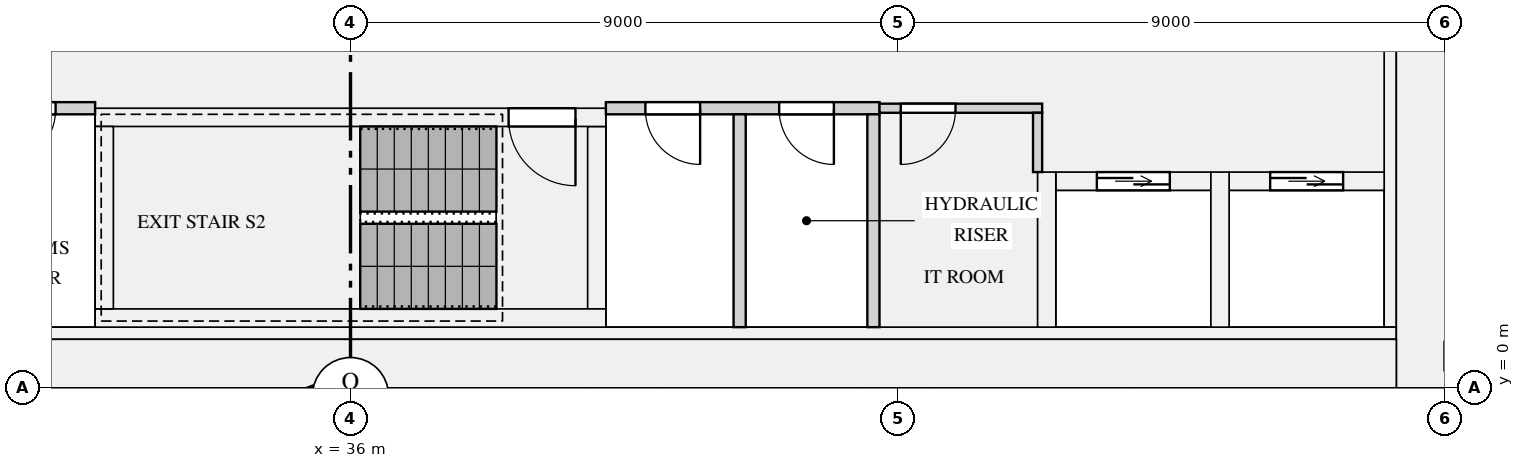
"""IFC4 building model, lengths in metres.
Left out: names, types, materials, properties, quantities, classifications, styles, units other than length and angle.
Written with IfcOpenShell. Run it as: python <this file> out.ifc"""

import sys

from ifc_helpers import new_model, si_unit, direction, frame, frame_2d, origin, place, context, subcontext, project, spatial, rectangle, extrude, element, fill, save


model = new_model("IFC4")
c1 = context("Model", 3, precision=1e-05, world=origin(), true_north=direction((0.0, 1.0)))
c2 = subcontext(c1, "Body", "Model", "MODEL_VIEW")
j1 = project(units=[si_unit("LENGTHUNIT", "METRE"), si_unit("PLANEANGLEUNIT", "RADIAN")], contexts=[c1])
p1 = place(None, origin())
s1 = spatial("IfcSite", under=j1, at=p1, CompositionType="ELEMENT")
p2 = place(p1, origin())
s2 = spatial("IfcBuilding", under=s1, at=p2, CompositionType="ELEMENT")
p3 = place(p2, frame((0.0, 0.0, 83.55)))
s3 = spatial("IfcBuildingStorey", under=s2, at=p3, CompositionType="ELEMENT", Elevation=83.55)
p4 = place(p3, frame((53.6, 0.0, 0.0), z_axis=(0.0, 0.0, 1.0), x_axis=(0.0, 1.0, 0.0)))
e1 = element("IfcWall", 1, at=p4, inside=s3, PredefinedType="SHEAR", context=c2, shape_type="SweptSolid", body=[
    extrude(rectangle(XDim=12.5, YDim=0.8, at=frame_2d((6.25, 0.0))), origin(), (0.0, 0.0, 1.0), 3.15),
])
p5 = place(p3, frame((18.8, 0.4, 0.0), z_axis=(0.0, 0.0, 1.0), x_axis=(1.0, 0.0, 0.0)))
e2 = element("IfcWall", 2, at=p5, inside=s3, PredefinedType="SHEAR", context=c2, shape_type="SweptSolid", body=[
    extrude(rectangle(XDim=34.4, YDim=0.8, at=frame_2d((17.2, 0.0))), origin(), (0.0, 0.0, 1.0), 3.15),
])
p6 = place(p3, frame((53.1, 1.0, 0.0), z_axis=(0.0, 0.0, 1.0), x_axis=(0.0, 1.0, 0.0)))
e3 = element("IfcWall", 3, at=p6, inside=s3, PredefinedType="SHEAR", context=c2, shape_type="SweptSolid", body=[
    extrude(rectangle(XDim=10.9, YDim=0.2, at=frame_2d((5.45, 0.0))), origin(), (0.0, 0.0, 1.0), 3.15),
])
p7 = place(p3, frame((18.8, 0.9, 0.0), z_axis=(0.0, 0.0, 1.0), x_axis=(1.0, 0.0, 0.0)))
e4 = element("IfcWall", 4, at=p7, inside=s3, PredefinedType="SHEAR", context=c2, shape_type="SweptSolid", body=[
    extrude(rectangle(XDim=34.4, YDim=0.2, at=frame_2d((17.2, 0.0))), origin(), (0.0, 0.0, 1.0), 3.15),
])
p8 = place(p3, frame((47.6, 3.4, 0.0), z_axis=(0.0, 0.0, 1.0), x_axis=(1.0, 0.0, 0.0)))
e5 = element("IfcWall", 5, at=p8, inside=s3, PredefinedType="SHEAR", context=c2, shape_type="SweptSolid", body=[
    extrude(rectangle(XDim=2.55, YDim=0.3, at=frame_2d((1.275, 0.0))), origin(), (0.0, 0.0, 1.0), 3.15),
])
p9 = place(p8, frame((0.675, 0.0, 0.0)))
e6 = element("IfcOpeningElement", 6, at=p9, cuts=e5, PredefinedType="OPENING", context=c2, shape_type="SweptSolid", body=[
    extrude(rectangle(XDim=1.2, YDim=2.1, at=frame_2d((0.6, 1.05))), frame((0.0, 0.16, 0.0), z_axis=(0.0, -1.0, 0.0), x_axis=(1.0, 0.0, 0.0)), (0.0, 0.0, 1.0), 0.32),
])
p10 = place(p3, frame((47.45, 1.0, 0.0), z_axis=(0.0, 0.0, 1.0), x_axis=(0.0, 1.0, 0.0)))
e7 = element("IfcWall", 7, at=p10, inside=s3, PredefinedType="SHEAR", context=c2, shape_type="SweptSolid", body=[
    extrude(rectangle(XDim=2.55, YDim=0.3, at=frame_2d((1.275, 0.0))), origin(), (0.0, 0.0, 1.0), 3.15),
])
p11 = place(p3, frame((50.45, 3.4, 0.0), z_axis=(0.0, 0.0, 1.0), x_axis=(1.0, 0.0, 0.0)))
e8 = element("IfcWall", 8, at=p11, inside=s3, PredefinedType="SHEAR", context=c2, shape_type="SweptSolid", body=[
    extrude(rectangle(XDim=2.55, YDim=0.3, at=frame_2d((1.275, 0.0))), origin(), (0.0, 0.0, 1.0), 3.15),
])
p12 = place(p11, frame((0.675, 0.0, 0.0)))
e9 = element("IfcOpeningElement", 9, at=p12, cuts=e8, PredefinedType="OPENING", context=c2, shape_type="SweptSolid", body=[
    extrude(rectangle(XDim=1.2, YDim=2.1, at=frame_2d((0.6, 1.05))), frame((0.0, 0.16, 0.0), z_axis=(0.0, -1.0, 0.0), x_axis=(1.0, 0.0, 0.0)), (0.0, 0.0, 1.0), 0.32),
])
p13 = place(p3, frame((50.3, 1.0, 0.0), z_axis=(0.0, 0.0, 1.0), x_axis=(0.0, 1.0, 0.0)))
e10 = element("IfcWall", 10, at=p13, inside=s3, PredefinedType="SHEAR", context=c2, shape_type="SweptSolid", body=[
    extrude(rectangle(XDim=2.55, YDim=0.3, at=frame_2d((1.275, 0.0))), origin(), (0.0, 0.0, 1.0), 3.15),
])
p14 = place(p3, frame((31.8, 1.15, 0.0), z_axis=(0.0, 0.0, 1.0), x_axis=(1.0, 0.0, 0.0)))
e11 = element("IfcWall", 11, at=p14, inside=s3, PredefinedType="SHEAR", context=c2, shape_type="SweptSolid", body=[
    extrude(rectangle(XDim=8.4, YDim=0.3, at=frame_2d((4.2, 0.0))), origin(), (0.0, 0.0, 1.0), 3.15),
])
p15 = place(p3, frame((31.8, 4.45, 0.0), z_axis=(0.0, 0.0, 1.0), x_axis=(1.0, 0.0, 0.0)))
e12 = element("IfcWall", 12, at=p15, inside=s3, PredefinedType="SHEAR", context=c2, shape_type="SweptSolid", body=[
    extrude(rectangle(XDim=8.4, YDim=0.3, at=frame_2d((4.2, 0.0))), origin(), (0.0, 0.0, 1.0), 3.15),
])
p16 = place(p15, frame((6.8, 0.0, 0.0)))
e13 = element("IfcOpeningElement", 13, at=p16, cuts=e12, PredefinedType="OPENING", context=c2, shape_type="SweptSolid", body=[
    extrude(rectangle(XDim=1.1, YDim=2.1, at=frame_2d((0.55, 1.05))), frame((0.0, 0.16, 0.0), z_axis=(0.0, -1.0, 0.0), x_axis=(1.0, 0.0, 0.0)), (0.0, 0.0, 1.0), 0.32),
])
for number, where, z_axis, x_axis in (
    (14, (31.95, 1.3, 0.0), (0.0, 0.0, 1.0), (0.0, 1.0, 0.0)),
    (15, (40.05, 1.3, 0.0), (0.0, 0.0, 1.0), (0.0, 1.0, 0.0)),
):
    element("IfcWall", number, at=place(p3, frame(where, z_axis=z_axis, x_axis=x_axis)), inside=s3, PredefinedType="SHEAR", context=c2, shape_type="SweptSolid", body=[
        extrude(rectangle(XDim=3.0, YDim=0.3, at=frame_2d((1.5, 0.0))), origin(), (0.0, 0.0, 1.0), 3.15),
    ])
p17 = place(p3, frame((27.3, 4.6, 0.0), z_axis=(0.0, 0.0, 1.0), x_axis=(1.0, 0.0, 0.0)))
e16 = element("IfcWall", 16, at=p17, inside=s3, PredefinedType="PARTITIONING", context=c2, shape_type="SweptSolid", body=[
    extrude(rectangle(XDim=4.5, YDim=0.2, at=frame_2d((2.25, 0.0))), origin(), (0.0, 0.0, 1.0), 2.83),
])
p18 = place(p17, frame((0.75, 0.0, 0.0)))
e17 = element("IfcOpeningElement", 17, at=p18, cuts=e16, PredefinedType="OPENING", context=c2, shape_type="SweptSolid", body=[
    extrude(rectangle(XDim=0.9, YDim=2.1, at=frame_2d((0.45, 1.05))), frame((0.0, 0.11, 0.0), z_axis=(0.0, -1.0, 0.0), x_axis=(1.0, 0.0, 0.0)), (0.0, 0.0, 1.0), 0.22),
])
p19 = place(p17, frame((2.95, 0.0, 0.0)))
e18 = element("IfcOpeningElement", 18, at=p19, cuts=e16, PredefinedType="OPENING", context=c2, shape_type="SweptSolid", body=[
    extrude(rectangle(XDim=0.9, YDim=2.1, at=frame_2d((0.45, 1.05))), frame((0.0, 0.11, 0.0), z_axis=(0.0, -1.0, 0.0), x_axis=(1.0, 0.0, 0.0)), (0.0, 0.0, 1.0), 0.22),
])
p20 = place(p3, frame((40.2, 4.6, 0.0), z_axis=(0.0, 0.0, 1.0), x_axis=(1.0, 0.0, 0.0)))
e19 = element("IfcWall", 19, at=p20, inside=s3, PredefinedType="PARTITIONING", context=c2, shape_type="SweptSolid", body=[
    extrude(rectangle(XDim=4.5, YDim=0.2, at=frame_2d((2.25, 0.0))), origin(), (0.0, 0.0, 1.0), 2.83),
])
p21 = place(p20, frame((0.65, 0.0, 0.0)))
e20 = element("IfcOpeningElement", 20, at=p21, cuts=e19, PredefinedType="OPENING", context=c2, shape_type="SweptSolid", body=[
    extrude(rectangle(XDim=0.9, YDim=2.1, at=frame_2d((0.45, 1.05))), frame((0.0, 0.11, 0.0), z_axis=(0.0, -1.0, 0.0), x_axis=(1.0, 0.0, 0.0)), (0.0, 0.0, 1.0), 0.22),
])
p22 = place(p20, frame((2.85, 0.0, 0.0)))
e21 = element("IfcOpeningElement", 21, at=p22, cuts=e19, PredefinedType="OPENING", context=c2, shape_type="SweptSolid", body=[
    extrude(rectangle(XDim=0.9, YDim=2.1, at=frame_2d((0.45, 1.05))), frame((0.0, 0.11, 0.0), z_axis=(0.0, -1.0, 0.0), x_axis=(1.0, 0.0, 0.0)), (0.0, 0.0, 1.0), 0.22),
])
p23 = place(p3, frame((44.7, 4.6, 0.0), z_axis=(0.0, 0.0, 1.0), x_axis=(1.0, 0.0, 0.0)))
e22 = element("IfcWall", 22, at=p23, inside=s3, PredefinedType="PARTITIONING", context=c2, shape_type="SweptSolid", body=[
    extrude(rectangle(XDim=2.675, YDim=0.15, at=frame_2d((1.337, 0.0))), origin(), (0.0, 0.0, 1.0), 2.83),
])
p24 = place(p23, frame((0.35, 0.0, 0.0)))
e23 = element("IfcOpeningElement", 23, at=p24, cuts=e22, PredefinedType="OPENING", context=c2, shape_type="SweptSolid", body=[
    extrude(rectangle(XDim=0.9, YDim=2.1, at=frame_2d((0.45, 1.05))), frame((0.0, 0.085, 0.0), z_axis=(0.0, -1.0, 0.0), x_axis=(1.0, 0.0, 0.0)), (0.0, 0.0, 1.0), 0.17),
])
for number, where, z_axis, x_axis in (
    (24, (42.4, 1.0, 0.0), (0.0, 0.0, 1.0), (0.0, 1.0, 0.0)),
    (25, (44.6, 1.0, 0.0), (0.0, 0.0, 1.0), (0.0, 1.0, 0.0)),
):
    element("IfcWall", number, at=place(p3, frame(where, z_axis=z_axis, x_axis=x_axis)), inside=s3, PredefinedType="PARTITIONING", context=c2, shape_type="SweptSolid", body=[
        extrude(rectangle(XDim=3.5, YDim=0.2, at=frame_2d((1.75, 0.0))), origin(), (0.0, 0.0, 1.0), 2.83),
    ])
p25 = place(p3, frame((47.3, 3.55, 0.0), z_axis=(0.0, 0.0, 1.0), x_axis=(0.0, 1.0, 0.0)))
e26 = element("IfcWall", 26, at=p25, inside=s3, PredefinedType="PARTITIONING", context=c2, shape_type="SweptSolid", body=[
    extrude(rectangle(XDim=0.975, YDim=0.15, at=frame_2d((0.487, 0.0))), origin(), (0.0, 0.0, 1.0), 2.83),
])
p26 = place(p9, origin())
e27 = element("IfcDoor", 27, at=p26, inside=s3, OperationType="DOUBLE_DOOR_SLIDING", PredefinedType="DOOR", context=c2, shape_type="SweptSolid", body=[
    extrude(rectangle(XDim=1.2, YDim=2.1, at=frame_2d((0.6, 1.05))), frame((0.0, 0.025, 0.0), z_axis=(0.0, -1.0, 0.0), x_axis=(1.0, 0.0, 0.0)), (0.0, 0.0, 1.0), 0.05),
])
fill(e6, e27)
p27 = place(p12, origin())
e28 = element("IfcDoor", 28, at=p27, inside=s3, OperationType="DOUBLE_DOOR_SLIDING", PredefinedType="DOOR", context=c2, shape_type="SweptSolid", body=[
    extrude(rectangle(XDim=1.2, YDim=2.1, at=frame_2d((0.6, 1.05))), frame((0.0, 0.025, 0.0), z_axis=(0.0, -1.0, 0.0), x_axis=(1.0, 0.0, 0.0)), (0.0, 0.0, 1.0), 0.05),
])
fill(e9, e28)
p28 = place(p16, frame((1.1, 0.0, 0.0), z_axis=(0.0, 0.0, 1.0), x_axis=(-1.0, 0.0, 0.0)))
e29 = element("IfcDoor", 29, at=p28, inside=s3, OperationType="SINGLE_SWING_LEFT", PredefinedType="DOOR", context=c2, shape_type="SweptSolid", body=[
    extrude(rectangle(XDim=1.1, YDim=2.1, at=frame_2d((0.55, 1.05))), frame((0.0, 0.025, 0.0), z_axis=(0.0, -1.0, 0.0), x_axis=(1.0, 0.0, 0.0)), (0.0, 0.0, 1.0), 0.05),
])
fill(e13, e29)
p29 = place(p24, frame((0.9, 0.0, 0.0), z_axis=(0.0, 0.0, 1.0), x_axis=(-1.0, 0.0, 0.0)))
e30 = element("IfcDoor", 30, at=p29, inside=s3, OperationType="SINGLE_SWING_RIGHT", PredefinedType="DOOR", context=c2, shape_type="SweptSolid", body=[
    extrude(rectangle(XDim=0.9, YDim=2.1, at=frame_2d((0.45, 1.05))), frame((0.0, 0.025, 0.0), z_axis=(0.0, -1.0, 0.0), x_axis=(1.0, 0.0, 0.0)), (0.0, 0.0, 1.0), 0.05),
])
fill(e23, e30)
p30 = place(p19, frame((0.9, 0.0, 0.0), z_axis=(0.0, 0.0, 1.0), x_axis=(-1.0, 0.0, 0.0)))
e31 = element("IfcDoor", 31, at=p30, inside=s3, OperationType="SINGLE_SWING_RIGHT", PredefinedType="DOOR", context=c2, shape_type="SweptSolid", body=[
    extrude(rectangle(XDim=0.9, YDim=2.1, at=frame_2d((0.45, 1.05))), frame((0.0, 0.025, 0.0), z_axis=(0.0, -1.0, 0.0), x_axis=(1.0, 0.0, 0.0)), (0.0, 0.0, 1.0), 0.05),
])
fill(e18, e31)
p31 = place(p21, frame((0.9, 0.0, 0.0), z_axis=(0.0, 0.0, 1.0), x_axis=(-1.0, 0.0, 0.0)))
e32 = element("IfcDoor", 32, at=p31, inside=s3, OperationType="SINGLE_SWING_LEFT", PredefinedType="DOOR", context=c2, shape_type="SweptSolid", body=[
    extrude(rectangle(XDim=0.9, YDim=2.1, at=frame_2d((0.45, 1.05))), frame((0.0, 0.025, 0.0), z_axis=(0.0, -1.0, 0.0), x_axis=(1.0, 0.0, 0.0)), (0.0, 0.0, 1.0), 0.05),
])
fill(e20, e32)
p32 = place(p22, frame((0.9, 0.0, 0.0), z_axis=(0.0, 0.0, 1.0), x_axis=(-1.0, 0.0, 0.0)))
e33 = element("IfcDoor", 33, at=p32, inside=s3, OperationType="SINGLE_SWING_LEFT", PredefinedType="DOOR", context=c2, shape_type="SweptSolid", body=[
    extrude(rectangle(XDim=0.9, YDim=2.1, at=frame_2d((0.45, 1.05))), frame((0.0, 0.025, 0.0), z_axis=(0.0, -1.0, 0.0), x_axis=(1.0, 0.0, 0.0)), (0.0, 0.0, 1.0), 0.05),
])
fill(e21, e33)
save(model, sys.argv[1])
